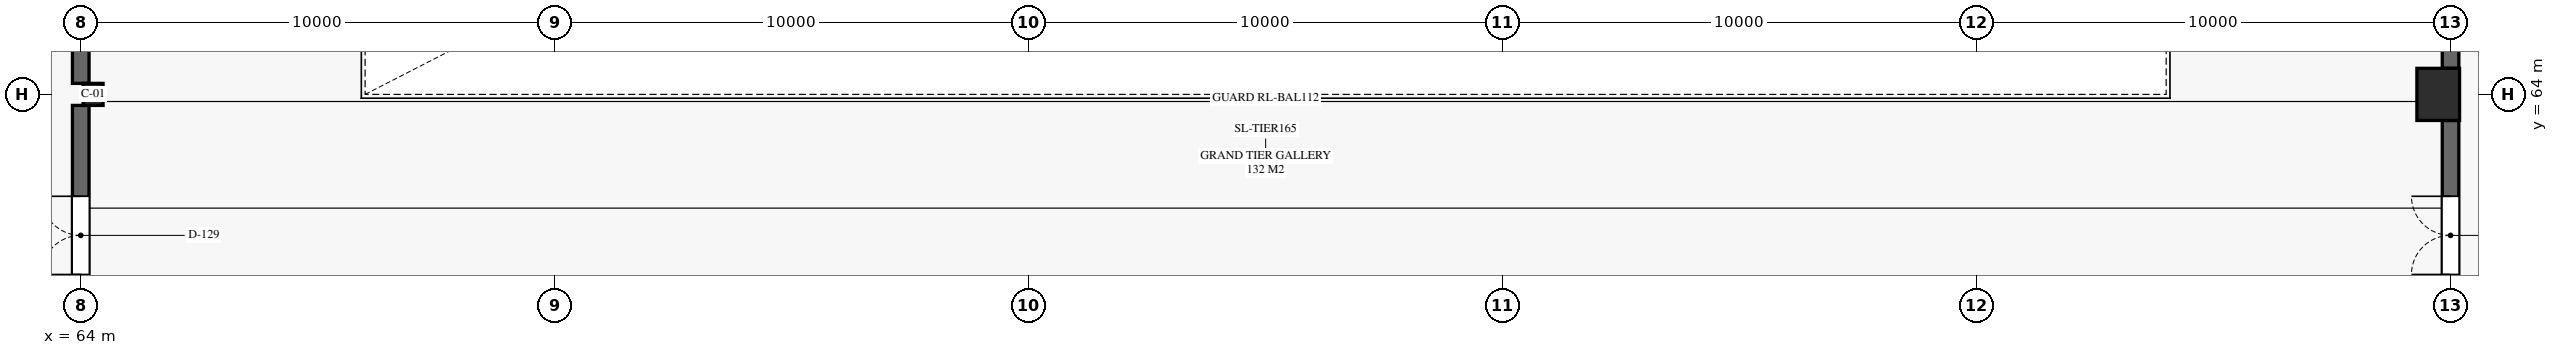
"""IFC4 building model, lengths in metres.
Left out: names, types, materials, properties, quantities, classifications, styles, units other than length and angle.
Written with IfcOpenShell. Run it as: python <this file> out.ifc"""

import sys

from ifc_helpers import new_model, si_unit, direction, frame, frame_2d, origin, origin_2d, place, context, subcontext, project, spatial, rectangle, i_section, extrude, element, fill, save


model = new_model("IFC4")
c1 = context("Model", 3, precision=1e-05, world=origin(), true_north=direction((0.0, 1.0)))
c2 = subcontext(c1, "Body", "Model", "MODEL_VIEW")
j1 = project(units=[si_unit("LENGTHUNIT", "METRE"), si_unit("PLANEANGLEUNIT", "RADIAN")], contexts=[c1])
p1 = place(None, origin())
s1 = spatial("IfcSite", under=j1, at=p1, CompositionType="ELEMENT")
p2 = place(p1, origin())
s2 = spatial("IfcBuilding", under=s1, at=p2, CompositionType="ELEMENT")
p3 = place(p2, frame((0.0, 0.0, 15.0)))
s3 = spatial("IfcBuildingStorey", under=s2, at=p3, CompositionType="ELEMENT", Elevation=15.0)
p4 = place(p3, frame((64.26, 64.0, 0.0), z_axis=(0.0, 0.0, 1.0), x_axis=(1.0, 0.0, 0.0)))
e1 = element("IfcColumn", 1, at=p4, inside=s3, PredefinedType="COLUMN", context=c2, shape_type="SweptSolid", body=[
    extrude(i_section(OverallWidth=0.422, OverallDepth=0.465, WebThickness=0.045, FlangeThickness=0.073, FilletRadius=0.02, at=origin_2d()), origin(), (0.0, 0.0, 1.0), 5.0),
])
p5 = place(p3, frame((113.74, 64.0, 0.0), z_axis=(0.0, 0.0, 1.0), x_axis=(1.0, 0.0, 0.0)))
e2 = element("IfcColumn", 2, at=p5, inside=s3, PredefinedType="COLUMN", context=c2, shape_type="SweptSolid", body=[
    extrude(rectangle(XDim=0.9, YDim=1.1, at=origin_2d()), origin(), (0.0, 0.0, 1.0), 5.0),
])
p6 = place(p3, frame((64.0, 58.0, 0.0), z_axis=(0.0, 0.0, 1.0), x_axis=(0.0, 1.0, 0.0)))
e3 = element("IfcWall", 3, at=p6, inside=s3, PredefinedType="SHEAR", context=c2, shape_type="SweptSolid", body=[
    extrude(rectangle(XDim=5.768, YDim=0.35, at=frame_2d((2.884, 0.0))), origin(), (0.0, 0.0, 1.0), 4.675),
])
p7 = place(p6, frame((2.2, 0.0, 0.0)))
e4 = element("IfcOpeningElement", 4, at=p7, cuts=e3, PredefinedType="OPENING", context=c2, shape_type="SweptSolid", body=[
    extrude(rectangle(XDim=1.65, YDim=2.3, at=frame_2d((0.825, 1.15))), frame((0.0, 0.185, 0.0), z_axis=(0.0, -1.0, 0.0), x_axis=(1.0, 0.0, 0.0)), (0.0, 0.0, 1.0), 0.37),
])
p8 = place(p3, frame((64.0, 64.232, 0.0), z_axis=(0.0, 0.0, 1.0), x_axis=(0.0, 1.0, 0.0)))
e5 = element("IfcWall", 5, at=p8, inside=s3, PredefinedType="SHEAR", context=c2, shape_type="SweptSolid", body=[
    extrude(rectangle(XDim=9.218, YDim=0.35, at=frame_2d((4.609, 0.0))), origin(), (0.0, 0.0, 1.0), 4.675),
])
p9 = place(p3, frame((114.0, 58.0, 0.0), z_axis=(0.0, 0.0, 1.0), x_axis=(0.0, 1.0, 0.0)))
e6 = element("IfcWall", 6, at=p9, inside=s3, PredefinedType="SHEAR", context=c2, shape_type="SweptSolid", body=[
    extrude(rectangle(XDim=5.45, YDim=0.35, at=frame_2d((2.725, 0.0))), origin(), (0.0, 0.0, 1.0), 4.675),
])
p10 = place(p9, frame((2.2, 0.0, 0.0)))
e7 = element("IfcOpeningElement", 7, at=p10, cuts=e6, PredefinedType="OPENING", context=c2, shape_type="SweptSolid", body=[
    extrude(rectangle(XDim=1.65, YDim=2.3, at=frame_2d((0.825, 1.15))), frame((0.0, 0.185, 0.0), z_axis=(0.0, -1.0, 0.0), x_axis=(1.0, 0.0, 0.0)), (0.0, 0.0, 1.0), 0.37),
])
p11 = place(p3, frame((114.0, 64.55, 0.0), z_axis=(0.0, 0.0, 1.0), x_axis=(0.0, 1.0, 0.0)))
e8 = element("IfcWall", 8, at=p11, inside=s3, PredefinedType="SHEAR", context=c2, shape_type="SweptSolid", body=[
    extrude(rectangle(XDim=9.218, YDim=0.35, at=frame_2d((4.609, 0.0))), origin(), (0.0, 0.0, 1.0), 4.675),
])
p12 = place(p7, origin())
e9 = element("IfcDoor", 9, at=p12, inside=s3, OperationType="DOUBLE_DOOR_SINGLE_SWING", PredefinedType="DOOR", context=c2, shape_type="SweptSolid", body=[
    extrude(rectangle(XDim=1.65, YDim=2.3, at=frame_2d((0.825, 1.15))), frame((0.0, 0.025, 0.0), z_axis=(0.0, -1.0, 0.0), x_axis=(1.0, 0.0, 0.0)), (0.0, 0.0, 1.0), 0.05),
])
fill(e4, e9)
p13 = place(p10, origin())
e10 = element("IfcDoor", 10, at=p13, inside=s3, OperationType="DOUBLE_DOOR_SINGLE_SWING", PredefinedType="DOOR", context=c2, shape_type="SweptSolid", body=[
    extrude(rectangle(XDim=1.65, YDim=2.3, at=frame_2d((0.825, 1.15))), frame((0.0, 0.025, 0.0), z_axis=(0.0, -1.0, 0.0), x_axis=(1.0, 0.0, 0.0)), (0.0, 0.0, 1.0), 0.05),
])
fill(e7, e10)
save(model, sys.argv[1])
